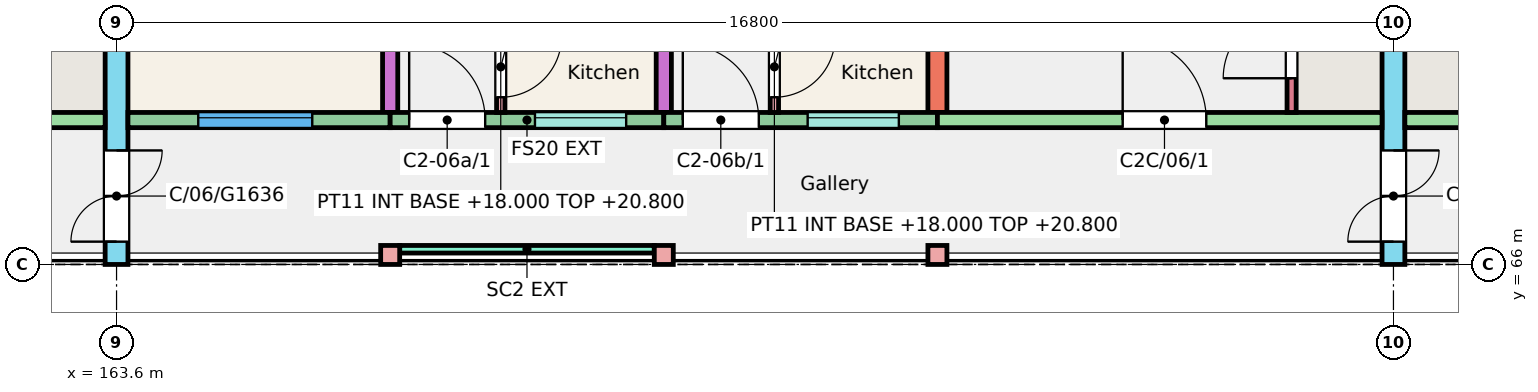
"""IFC4 building model, lengths in metres.
Left out: names, types, materials, properties, quantities, classifications, styles, units other than length and angle.
Written with IfcOpenShell. Run it as: python <this file> out.ifc"""

import sys

from ifc_helpers import new_model, si_unit, direction, frame, frame_2d, origin, origin_2d, place, context, subcontext, project, spatial, rectangle, extrude, element, fill, save


model = new_model("IFC4")
c1 = context("Model", 3, precision=1e-05, world=origin(), true_north=direction((0.0, 1.0)))
c2 = subcontext(c1, "Body", "Model", "MODEL_VIEW")
j1 = project(units=[si_unit("LENGTHUNIT", "METRE"), si_unit("PLANEANGLEUNIT", "RADIAN")], contexts=[c1])
p1 = place(None, origin())
s1 = spatial("IfcSite", under=j1, at=p1, CompositionType="ELEMENT")
p2 = place(p1, origin())
s2 = spatial("IfcBuilding", under=s1, at=p2, CompositionType="ELEMENT")
p3 = place(p2, frame((0.0, 0.0, 18.0)))
s3 = spatial("IfcBuildingStorey", under=s2, at=p3, CompositionType="ELEMENT", Elevation=18.0)
p4 = place(p3, frame((163.6, 66.0, 0.0), z_axis=(0.0, 0.0, 1.0), x_axis=(0.0, 1.0, 0.0)))
e1 = element("IfcWall", 1, at=p4, inside=s3, PredefinedType="SHEAR", context=c2, shape_type="SweptSolid", body=[
    extrude(rectangle(XDim=11.0, YDim=0.3, at=frame_2d((5.5, 0.0))), origin(), (0.0, 0.0, 1.0), 3.0),
])
p5 = place(p4, frame((0.3, 0.0, 0.0)))
e2 = element("IfcOpeningElement", 2, at=p5, cuts=e1, PredefinedType="OPENING", context=c2, shape_type="SweptSolid", body=[
    extrude(rectangle(XDim=1.2, YDim=2.1, at=frame_2d((0.6, 1.05))), frame((0.0, 0.16, 0.0), z_axis=(0.0, -1.0, 0.0), x_axis=(1.0, 0.0, 0.0)), (0.0, 0.0, 1.0), 0.32),
])
p6 = place(p3, frame((167.2, 68.0, 0.0), z_axis=(0.0, 0.0, 1.0), x_axis=(0.0, 1.0, 0.0)))
e3 = element("IfcWall", 3, at=p6, inside=s3, PredefinedType="SHEAR", context=c2, shape_type="SweptSolid", body=[
    extrude(rectangle(XDim=9.0, YDim=0.2, at=frame_2d((4.5, 0.0))), origin(), (0.0, 0.0, 1.0), 3.0),
])
p7 = place(p6, frame((2.4, 0.0, 0.0)))
e4 = element("IfcOpeningElement", 4, at=p7, cuts=e3, PredefinedType="OPENING", context=c2, shape_type="SweptSolid", body=[
    extrude(rectangle(XDim=1.2, YDim=2.1, at=frame_2d((0.6, 1.05))), frame((0.0, 0.11, 0.0), z_axis=(0.0, -1.0, 0.0), x_axis=(1.0, 0.0, 0.0)), (0.0, 0.0, 1.0), 0.22),
])
p8 = place(p6, frame((6.4, 0.0, 0.0)))
e5 = element("IfcOpeningElement", 5, at=p8, cuts=e3, PredefinedType="OPENING", context=c2, shape_type="SweptSolid", body=[
    extrude(rectangle(XDim=1.2, YDim=2.1, at=frame_2d((0.6, 1.05))), frame((0.0, 0.11, 0.0), z_axis=(0.0, -1.0, 0.0), x_axis=(1.0, 0.0, 0.0)), (0.0, 0.0, 1.0), 0.22),
])
p9 = place(p3, frame((170.8, 68.0, 0.0), z_axis=(0.0, 0.0, 1.0), x_axis=(0.0, 1.0, 0.0)))
e6 = element("IfcWall", 6, at=p9, inside=s3, PredefinedType="SHEAR", context=c2, shape_type="SweptSolid", body=[
    extrude(rectangle(XDim=9.0, YDim=0.2, at=frame_2d((4.5, 0.0))), origin(), (0.0, 0.0, 1.0), 3.0),
])
p10 = place(p3, frame((174.4, 68.0, 0.0), z_axis=(0.0, 0.0, 1.0), x_axis=(0.0, 1.0, 0.0)))
e7 = element("IfcWall", 7, at=p10, inside=s3, PredefinedType="SHEAR", context=c2, shape_type="SweptSolid", body=[
    extrude(rectangle(XDim=9.0, YDim=0.25, at=frame_2d((4.5, 0.0))), origin(), (0.0, 0.0, 1.0), 3.0),
])
p11 = place(p3, frame((180.4, 66.0, 0.0), z_axis=(0.0, 0.0, 1.0), x_axis=(0.0, 1.0, 0.0)))
e8 = element("IfcWall", 8, at=p11, inside=s3, PredefinedType="SHEAR", context=c2, shape_type="SweptSolid", body=[
    extrude(rectangle(XDim=11.0, YDim=0.3, at=frame_2d((5.5, 0.0))), origin(), (0.0, 0.0, 1.0), 3.0),
])
p12 = place(p11, frame((0.3, 0.0, 0.0)))
e9 = element("IfcOpeningElement", 9, at=p12, cuts=e8, PredefinedType="OPENING", context=c2, shape_type="SweptSolid", body=[
    extrude(rectangle(XDim=1.2, YDim=2.1, at=frame_2d((0.6, 1.05))), frame((0.0, 0.16, 0.0), z_axis=(0.0, -1.0, 0.0), x_axis=(1.0, 0.0, 0.0)), (0.0, 0.0, 1.0), 0.32),
])
p13 = place(p3, frame((157.6, 67.9, 0.0), z_axis=(0.0, 0.0, 1.0), x_axis=(1.0, 0.0, 0.0)))
e10 = element("IfcWall", 10, at=p13, inside=s3, PredefinedType="SHEAR", context=c2, shape_type="SweptSolid", body=[
    extrude(rectangle(XDim=5.85, YDim=0.2, at=frame_2d((2.925, 0.0))), origin(), (0.0, 0.0, 1.0), 3.0),
])
p14 = place(p13, frame((2.438, 0.0, 0.0)))
e11 = element("IfcOpeningElement", 11, at=p14, cuts=e10, PredefinedType="OPENING", context=c2, shape_type="SweptSolid", body=[
    extrude(rectangle(XDim=1.1, YDim=2.1, at=frame_2d((0.55, 1.05))), frame((0.0, 0.11, 0.0), z_axis=(0.0, -1.0, 0.0), x_axis=(1.0, 0.0, 0.0)), (0.0, 0.0, 1.0), 0.22),
])
p15 = place(p3, frame((163.75, 67.9, 0.0), z_axis=(0.0, 0.0, 1.0), x_axis=(1.0, 0.0, 0.0)))
e12 = element("IfcWall", 12, at=p15, inside=s3, PredefinedType="SOLIDWALL", context=c2, shape_type="SweptSolid", body=[
    extrude(rectangle(XDim=3.45, YDim=0.2, at=frame_2d((1.725, 0.0))), origin(), (0.0, 0.0, 1.0), 3.0),
])
p16 = place(p15, frame((0.925, 0.0, 0.9)))
e13 = element("IfcOpeningElement", 13, at=p16, cuts=e12, PredefinedType="OPENING", context=c2, shape_type="SweptSolid", body=[
    extrude(rectangle(XDim=1.5, YDim=1.5, at=frame_2d((0.75, 0.75))), frame((0.0, 0.11, 0.0), z_axis=(0.0, -1.0, 0.0), x_axis=(1.0, 0.0, 0.0)), (0.0, 0.0, 1.0), 0.22),
])
p17 = place(p3, frame((167.2, 67.9, 0.0), z_axis=(0.0, 0.0, 1.0), x_axis=(1.0, 0.0, 0.0)))
e14 = element("IfcWall", 14, at=p17, inside=s3, PredefinedType="SOLIDWALL", context=c2, shape_type="SweptSolid", body=[
    extrude(rectangle(XDim=3.6, YDim=0.2, at=frame_2d((1.8, 0.0))), origin(), (0.0, 0.0, 1.0), 3.0),
])
p18 = place(p17, frame((1.905, 0.0, 1.1)))
e15 = element("IfcOpeningElement", 15, at=p18, cuts=e14, PredefinedType="OPENING", context=c2, shape_type="SweptSolid", body=[
    extrude(rectangle(XDim=1.2, YDim=1.3, at=frame_2d((0.6, 0.65))), frame((0.0, 0.11, 0.0), z_axis=(0.0, -1.0, 0.0), x_axis=(1.0, 0.0, 0.0)), (0.0, 0.0, 1.0), 0.22),
])
p19 = place(p17, frame((0.25, 0.0, 0.0)))
e16 = element("IfcOpeningElement", 16, at=p19, cuts=e14, PredefinedType="OPENING", context=c2, shape_type="SweptSolid", body=[
    extrude(rectangle(XDim=1.0, YDim=2.1, at=frame_2d((0.5, 1.05))), frame((0.0, 0.11, 0.0), z_axis=(0.0, -1.0, 0.0), x_axis=(1.0, 0.0, 0.0)), (0.0, 0.0, 1.0), 0.22),
])
p20 = place(p3, frame((170.8, 67.9, 0.0), z_axis=(0.0, 0.0, 1.0), x_axis=(1.0, 0.0, 0.0)))
e17 = element("IfcWall", 17, at=p20, inside=s3, PredefinedType="SOLIDWALL", context=c2, shape_type="SweptSolid", body=[
    extrude(rectangle(XDim=3.6, YDim=0.2, at=frame_2d((1.8, 0.0))), origin(), (0.0, 0.0, 1.0), 3.0),
])
p21 = place(p20, frame((1.893, 0.0, 1.1)))
e18 = element("IfcOpeningElement", 18, at=p21, cuts=e17, PredefinedType="OPENING", context=c2, shape_type="SweptSolid", body=[
    extrude(rectangle(XDim=1.2, YDim=1.3, at=frame_2d((0.6, 0.65))), frame((0.0, 0.11, 0.0), z_axis=(0.0, -1.0, 0.0), x_axis=(1.0, 0.0, 0.0)), (0.0, 0.0, 1.0), 0.22),
])
p22 = place(p20, frame((0.25, 0.0, 0.0)))
e19 = element("IfcOpeningElement", 19, at=p22, cuts=e17, PredefinedType="OPENING", context=c2, shape_type="SweptSolid", body=[
    extrude(rectangle(XDim=1.0, YDim=2.1, at=frame_2d((0.5, 1.05))), frame((0.0, 0.11, 0.0), z_axis=(0.0, -1.0, 0.0), x_axis=(1.0, 0.0, 0.0)), (0.0, 0.0, 1.0), 0.22),
])
p23 = place(p3, frame((174.4, 67.9, 0.0), z_axis=(0.0, 0.0, 1.0), x_axis=(1.0, 0.0, 0.0)))
e20 = element("IfcWall", 20, at=p23, inside=s3, PredefinedType="SHEAR", context=c2, shape_type="SweptSolid", body=[
    extrude(rectangle(XDim=5.85, YDim=0.2, at=frame_2d((2.925, 0.0))), origin(), (0.0, 0.0, 1.0), 3.0),
])
p24 = place(p23, frame((2.438, 0.0, 0.0)))
e21 = element("IfcOpeningElement", 21, at=p24, cuts=e20, PredefinedType="OPENING", context=c2, shape_type="SweptSolid", body=[
    extrude(rectangle(XDim=1.1, YDim=2.1, at=frame_2d((0.55, 1.05))), frame((0.0, 0.11, 0.0), z_axis=(0.0, -1.0, 0.0), x_axis=(1.0, 0.0, 0.0)), (0.0, 0.0, 1.0), 0.22),
])
p25 = place(p3, frame((179.06, 68.0, 0.0), z_axis=(0.0, 0.0, 1.0), x_axis=(0.0, 1.0, 0.0)))
e22 = element("IfcWall", 22, at=p25, inside=s3, PredefinedType="SHEAR", context=c2, shape_type="SweptSolid", body=[
    extrude(rectangle(XDim=1.72, YDim=0.12, at=frame_2d((0.86, 0.0))), origin(), (0.0, 0.0, 1.0), 3.0),
])
p26 = place(p25, frame((0.45, 0.0, 0.0)))
e23 = element("IfcOpeningElement", 23, at=p26, cuts=e22, PredefinedType="OPENING", context=c2, shape_type="SweptSolid", body=[
    extrude(rectangle(XDim=0.9, YDim=2.1, at=frame_2d((0.45, 1.05))), frame((0.0, 0.07, 0.0), z_axis=(0.0, -1.0, 0.0), x_axis=(1.0, 0.0, 0.0)), (0.0, 0.0, 1.0), 0.14),
])
p27 = place(p3, frame((180.55, 67.9, 0.0), z_axis=(0.0, 0.0, 1.0), x_axis=(1.0, 0.0, 0.0)))
e24 = element("IfcWall", 24, at=p27, inside=s3, PredefinedType="SHEAR", context=c2, shape_type="SweptSolid", body=[
    extrude(rectangle(XDim=5.85, YDim=0.2, at=frame_2d((2.925, 0.0))), origin(), (0.0, 0.0, 1.0), 3.0),
])
p28 = place(p27, frame((2.312, 0.0, 0.0)))
e25 = element("IfcOpeningElement", 25, at=p28, cuts=e24, PredefinedType="OPENING", context=c2, shape_type="SweptSolid", body=[
    extrude(rectangle(XDim=1.1, YDim=2.1, at=frame_2d((0.55, 1.05))), frame((0.0, 0.11, 0.0), z_axis=(0.0, -1.0, 0.0), x_axis=(1.0, 0.0, 0.0)), (0.0, 0.0, 1.0), 0.22),
])
for number, where, z_axis, x_axis in (
    (26, (167.2, 66.125, 0.0), (0.0, 0.0, 1.0), (1.0, 0.0, 0.0)),
    (27, (170.8, 66.125, 0.0), (0.0, 0.0, 1.0), (1.0, 0.0, 0.0)),
    (28, (174.4, 66.125, 0.0), (0.0, 0.0, 1.0), (1.0, 0.0, 0.0)),
):
    element("IfcColumn", number, at=place(p3, frame(where, z_axis=z_axis, x_axis=x_axis)), inside=s3, PredefinedType="COLUMN", context=c2, shape_type="SweptSolid", body=[
        extrude(rectangle(XDim=0.25, YDim=0.25, at=origin_2d()), origin(), (0.0, 0.0, 1.0), 3.0),
    ])
p29 = place(p3, frame((167.325, 66.2, 0.0), z_axis=(0.0, 0.0, 1.0), x_axis=(1.0, 0.0, 0.0)))
e29 = element("IfcWall", 29, at=p29, inside=s3, PredefinedType="SOLIDWALL", context=c2, shape_type="SweptSolid", body=[
    extrude(rectangle(XDim=3.35, YDim=0.1, at=frame_2d((1.675, 0.0))), origin(), (0.0, 0.0, 1.0), 2.45),
])
p30 = place(p3, frame((168.655, 68.0, 0.0), z_axis=(0.0, 0.0, 1.0), x_axis=(0.0, 1.0, 0.0)))
e30 = element("IfcWall", 30, at=p30, inside=s3, PredefinedType="PARTITIONING", context=c2, shape_type="SweptSolid", body=[
    extrude(rectangle(XDim=4.7, YDim=0.11, at=frame_2d((2.35, 0.0))), origin(), (0.0, 0.0, 1.0), 2.8),
])
p31 = place(p30, frame((0.2, 0.0, 0.0)))
e31 = element("IfcOpeningElement", 31, at=p31, cuts=e30, PredefinedType="OPENING", context=c2, shape_type="SweptSolid", body=[
    extrude(rectangle(XDim=0.8, YDim=2.1, at=frame_2d((0.4, 1.05))), frame((0.0, 0.065, 0.0), z_axis=(0.0, -1.0, 0.0), x_axis=(1.0, 0.0, 0.0)), (0.0, 0.0, 1.0), 0.13),
])
p32 = place(p30, frame((3.75, 0.0, 0.0)))
e32 = element("IfcOpeningElement", 32, at=p32, cuts=e30, PredefinedType="OPENING", context=c2, shape_type="SweptSolid", body=[
    extrude(rectangle(XDim=0.8, YDim=2.1, at=frame_2d((0.4, 1.05))), frame((0.0, 0.065, 0.0), z_axis=(0.0, -1.0, 0.0), x_axis=(1.0, 0.0, 0.0)), (0.0, 0.0, 1.0), 0.13),
])
p33 = place(p3, frame((172.255, 68.0, 0.0), z_axis=(0.0, 0.0, 1.0), x_axis=(0.0, 1.0, 0.0)))
e33 = element("IfcWall", 33, at=p33, inside=s3, PredefinedType="PARTITIONING", context=c2, shape_type="SweptSolid", body=[
    extrude(rectangle(XDim=4.3, YDim=0.11, at=frame_2d((2.15, 0.0))), origin(), (0.0, 0.0, 1.0), 2.8),
])
p34 = place(p33, frame((0.2, 0.0, 0.0)))
e34 = element("IfcOpeningElement", 34, at=p34, cuts=e33, PredefinedType="OPENING", context=c2, shape_type="SweptSolid", body=[
    extrude(rectangle(XDim=0.8, YDim=2.1, at=frame_2d((0.4, 1.05))), frame((0.0, 0.065, 0.0), z_axis=(0.0, -1.0, 0.0), x_axis=(1.0, 0.0, 0.0)), (0.0, 0.0, 1.0), 0.13),
])
p35 = place(p33, frame((3.35, 0.0, 0.0)))
e35 = element("IfcOpeningElement", 35, at=p35, cuts=e33, PredefinedType="OPENING", context=c2, shape_type="SweptSolid", body=[
    extrude(rectangle(XDim=0.8, YDim=2.1, at=frame_2d((0.4, 1.05))), frame((0.0, 0.065, 0.0), z_axis=(0.0, -1.0, 0.0), x_axis=(1.0, 0.0, 0.0)), (0.0, 0.0, 1.0), 0.13),
])
p36 = place(p16, origin())
e36 = element("IfcWindow", 36, at=p36, inside=s3, PartitioningType="SINGLE_PANEL", PredefinedType="WINDOW", context=c2, shape_type="SweptSolid", body=[
    extrude(rectangle(XDim=1.5, YDim=1.5, at=frame_2d((0.75, 0.75))), frame((0.0, 0.06, 0.0), z_axis=(0.0, -1.0, 0.0), x_axis=(1.0, 0.0, 0.0)), (0.0, 0.0, 1.0), 0.06),
])
fill(e13, e36)
p37 = place(p18, origin())
e37 = element("IfcWindow", 37, at=p37, inside=s3, PartitioningType="SINGLE_PANEL", PredefinedType="WINDOW", context=c2, shape_type="SweptSolid", body=[
    extrude(rectangle(XDim=1.2, YDim=1.3, at=frame_2d((0.6, 0.65))), frame((0.0, 0.06, 0.0), z_axis=(0.0, -1.0, 0.0), x_axis=(1.0, 0.0, 0.0)), (0.0, 0.0, 1.0), 0.06),
])
fill(e15, e37)
p38 = place(p21, origin())
e38 = element("IfcWindow", 38, at=p38, inside=s3, PartitioningType="SINGLE_PANEL", PredefinedType="WINDOW", context=c2, shape_type="SweptSolid", body=[
    extrude(rectangle(XDim=1.2, YDim=1.3, at=frame_2d((0.6, 0.65))), frame((0.0, 0.06, 0.0), z_axis=(0.0, -1.0, 0.0), x_axis=(1.0, 0.0, 0.0)), (0.0, 0.0, 1.0), 0.06),
])
fill(e18, e38)
p39 = place(p19, origin())
e39 = element("IfcDoor", 39, at=p39, inside=s3, OperationType="SINGLE_SWING_LEFT", PredefinedType="DOOR", context=c2, shape_type="SweptSolid", body=[
    extrude(rectangle(XDim=1.0, YDim=2.1, at=frame_2d((0.5, 1.05))), frame((0.0, 0.025, 0.0), z_axis=(0.0, -1.0, 0.0), x_axis=(1.0, 0.0, 0.0)), (0.0, 0.0, 1.0), 0.05),
])
fill(e16, e39)
p40 = place(p31, origin())
e40 = element("IfcDoor", 40, at=p40, inside=s3, OperationType="SINGLE_SWING_RIGHT", PredefinedType="DOOR", context=c2, shape_type="SweptSolid", body=[
    extrude(rectangle(XDim=0.8, YDim=2.1, at=frame_2d((0.4, 1.05))), frame((0.0, 0.025, 0.0), z_axis=(0.0, -1.0, 0.0), x_axis=(1.0, 0.0, 0.0)), (0.0, 0.0, 1.0), 0.05),
])
fill(e31, e40)
p41 = place(p22, origin())
e41 = element("IfcDoor", 41, at=p41, inside=s3, OperationType="SINGLE_SWING_LEFT", PredefinedType="DOOR", context=c2, shape_type="SweptSolid", body=[
    extrude(rectangle(XDim=1.0, YDim=2.1, at=frame_2d((0.5, 1.05))), frame((0.0, 0.025, 0.0), z_axis=(0.0, -1.0, 0.0), x_axis=(1.0, 0.0, 0.0)), (0.0, 0.0, 1.0), 0.05),
])
fill(e19, e41)
p42 = place(p34, origin())
e42 = element("IfcDoor", 42, at=p42, inside=s3, OperationType="SINGLE_SWING_RIGHT", PredefinedType="DOOR", context=c2, shape_type="SweptSolid", body=[
    extrude(rectangle(XDim=0.8, YDim=2.1, at=frame_2d((0.4, 1.05))), frame((0.0, 0.025, 0.0), z_axis=(0.0, -1.0, 0.0), x_axis=(1.0, 0.0, 0.0)), (0.0, 0.0, 1.0), 0.05),
])
fill(e34, e42)
p43 = place(p24, origin())
e43 = element("IfcDoor", 43, at=p43, inside=s3, OperationType="SINGLE_SWING_LEFT", PredefinedType="DOOR", context=c2, shape_type="SweptSolid", body=[
    extrude(rectangle(XDim=1.1, YDim=2.1, at=frame_2d((0.55, 1.05))), frame((0.0, 0.025, 0.0), z_axis=(0.0, -1.0, 0.0), x_axis=(1.0, 0.0, 0.0)), (0.0, 0.0, 1.0), 0.05),
])
fill(e21, e43)
p44 = place(p26, origin())
e44 = element("IfcDoor", 44, at=p44, inside=s3, OperationType="SINGLE_SWING_LEFT", PredefinedType="DOOR", context=c2, shape_type="SweptSolid", body=[
    extrude(rectangle(XDim=0.9, YDim=2.1, at=frame_2d((0.45, 1.05))), frame((0.0, 0.025, 0.0), z_axis=(0.0, -1.0, 0.0), x_axis=(1.0, 0.0, 0.0)), (0.0, 0.0, 1.0), 0.05),
])
fill(e23, e44)
p45 = place(p5, origin())
e45 = element("IfcDoor", 45, at=p45, inside=s3, OperationType="DOUBLE_DOOR_SINGLE_SWING", PredefinedType="DOOR", context=c2, shape_type="SweptSolid", body=[
    extrude(rectangle(XDim=1.2, YDim=2.1, at=frame_2d((0.6, 1.05))), frame((0.0, 0.025, 0.0), z_axis=(0.0, -1.0, 0.0), x_axis=(1.0, 0.0, 0.0)), (0.0, 0.0, 1.0), 0.05),
])
fill(e2, e45)
p46 = place(p12, origin())
e46 = element("IfcDoor", 46, at=p46, inside=s3, OperationType="DOUBLE_DOOR_SINGLE_SWING", PredefinedType="DOOR", context=c2, shape_type="SweptSolid", body=[
    extrude(rectangle(XDim=1.2, YDim=2.1, at=frame_2d((0.6, 1.05))), frame((0.0, 0.025, 0.0), z_axis=(0.0, -1.0, 0.0), x_axis=(1.0, 0.0, 0.0)), (0.0, 0.0, 1.0), 0.05),
])
fill(e9, e46)
save(model, sys.argv[1])
